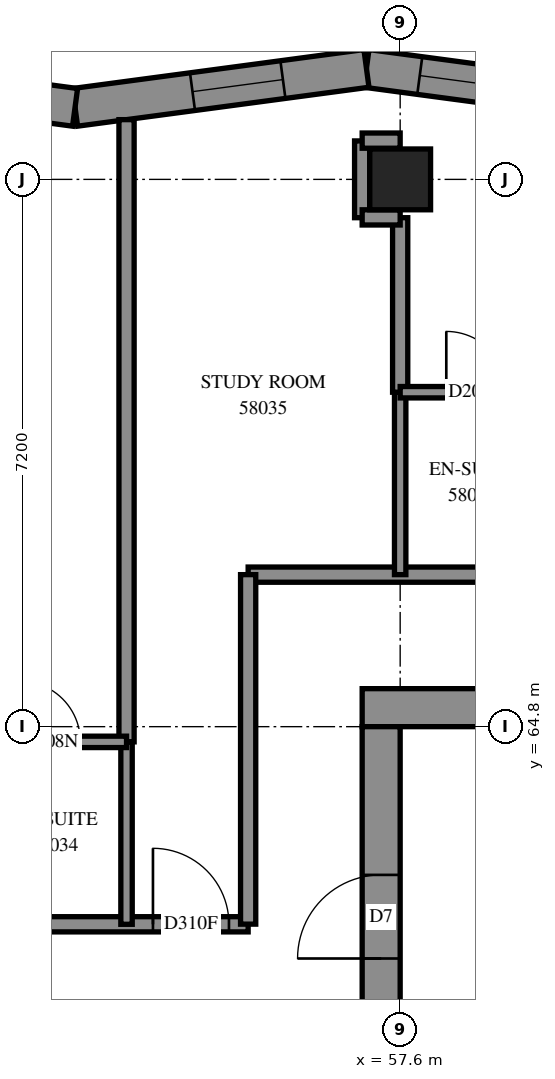
"""IFC4 building model, lengths in metres.
Left out: names, types, materials, properties, quantities, classifications, styles, units other than length and angle.
Written with IfcOpenShell. Run it as: python <this file> out.ifc"""

import sys

from ifc_helpers import new_model, si_unit, direction, frame, frame_2d, origin, origin_2d, place, context, subcontext, project, spatial, polyline, rectangle, outline, extrude, element, fill, save


model = new_model("IFC4")
c1 = context("Model", 3, precision=1e-05, world=origin(), true_north=direction((0.0, 1.0)))
c2 = subcontext(c1, "Body", "Model", "MODEL_VIEW")
j1 = project(units=[si_unit("LENGTHUNIT", "METRE"), si_unit("PLANEANGLEUNIT", "RADIAN")], contexts=[c1])
p1 = place(None, origin())
s1 = spatial("IfcSite", under=j1, at=p1, CompositionType="ELEMENT")
p2 = place(p1, origin())
s2 = spatial("IfcBuilding", under=s1, at=p2, CompositionType="ELEMENT")
p3 = place(p2, frame((0.0, 0.0, 213.4)))
s3 = spatial("IfcBuildingStorey", under=s2, at=p3, CompositionType="ELEMENT", Elevation=213.4)
p4 = place(p3, frame((57.6, 72.0, 0.0), z_axis=(0.0, 0.0, 1.0), x_axis=(1.0, 0.0, 0.0)))
e1 = element("IfcColumn", 1, at=p4, inside=s3, PredefinedType="COLUMN", context=c2, shape_type="SweptSolid", body=[
    extrude(rectangle(XDim=0.8, YDim=0.8, at=origin_2d()), origin(), (0.0, 0.0, 1.0), 3.1),
])
p5 = place(p3, frame((57.1, 65.05, -0.3), z_axis=(0.0, 0.0, 1.0), x_axis=(1.0, 0.0, 0.0)))
e2 = element("IfcWall", 2, at=p5, inside=s3, PredefinedType="SHEAR", context=c2, shape_type="SweptSolid", body=[
    extrude(rectangle(XDim=15.4, YDim=0.5, at=frame_2d((7.7, 0.0))), origin(), (0.0, 0.0, 1.0), 2.7),
])
p6 = place(p5, frame((10.5, 0.0, 0.3)))
e3 = element("IfcOpeningElement", 3, at=p6, cuts=e2, PredefinedType="OPENING", context=c2, shape_type="SweptSolid", body=[
    extrude(rectangle(XDim=0.8, YDim=2.1, at=frame_2d((0.4, 1.05))), frame((0.0, 0.26, 0.0), z_axis=(0.0, -1.0, 0.0), x_axis=(1.0, 0.0, 0.0)), (0.0, 0.0, 1.0), 0.52),
])
p7 = place(p3, frame((57.35, 50.4, -0.3), z_axis=(0.0, 0.0, 1.0), x_axis=(0.0, 1.0, 0.0)))
e4 = element("IfcWall", 4, at=p7, inside=s3, PredefinedType="SHEAR", context=c2, shape_type="SweptSolid", body=[
    extrude(rectangle(XDim=14.4, YDim=0.5, at=frame_2d((7.2, 0.0))), origin(), (0.0, 0.0, 1.0), 2.7),
])
p8 = place(p7, frame((4.55, 0.0, 0.3)))
e5 = element("IfcOpeningElement", 5, at=p8, cuts=e4, PredefinedType="OPENING", context=c2, shape_type="SweptSolid", body=[
    extrude(rectangle(XDim=1.1, YDim=2.1, at=frame_2d((0.55, 1.05))), frame((0.0, 0.26, 0.0), z_axis=(0.0, -1.0, 0.0), x_axis=(1.0, 0.0, 0.0)), (0.0, 0.0, 1.0), 0.52),
])
p9 = place(p7, frame((11.35, 0.0, 0.3)))
e6 = element("IfcOpeningElement", 6, at=p9, cuts=e4, PredefinedType="OPENING", context=c2, shape_type="SweptSolid", body=[
    extrude(rectangle(XDim=1.1, YDim=2.1, at=frame_2d((0.55, 1.05))), frame((0.0, 0.26, 0.0), z_axis=(0.0, -1.0, 0.0), x_axis=(1.0, 0.0, 0.0)), (0.0, 0.0, 1.0), 0.52),
])
p10 = place(p3, frame((60.99, 72.948, 0.0), z_axis=(0.0, 0.0, 1.0), x_axis=(-0.9911989729, 0.1323804972, 0.0)))
e7 = element("IfcWall", 7, at=p10, inside=s3, PredefinedType="SOLIDWALL", context=c2, shape_type="SweptSolid", body=[
    extrude(outline(polyline([(0.033, -0.25), (3.901, -0.25), (3.834, 0.25), (-0.033, 0.25), (0.033, -0.25)])), origin(), (0.0, 0.0, 1.0), 3.1),
])
p11 = place(p10, frame((0.41, 0.0, 0.45)))
e8 = element("IfcOpeningElement", 8, at=p11, cuts=e7, PredefinedType="OPENING", context=c2, shape_type="SweptSolid", body=[
    extrude(rectangle(XDim=1.3, YDim=2.5, at=frame_2d((0.65, 1.25))), frame((0.0, 0.26, 0.0), z_axis=(0.0, -1.0, 0.0), x_axis=(1.0, 0.0, 0.0)), (0.0, 0.0, 1.0), 0.52),
])
p12 = place(p10, frame((1.86, 0.0, 0.45)))
e9 = element("IfcOpeningElement", 9, at=p12, cuts=e7, PredefinedType="OPENING", context=c2, shape_type="SweptSolid", body=[
    extrude(rectangle(XDim=1.3, YDim=2.5, at=frame_2d((0.65, 1.25))), frame((0.0, 0.26, 0.0), z_axis=(0.0, -1.0, 0.0), x_axis=(1.0, 0.0, 0.0)), (0.0, 0.0, 1.0), 0.52),
])
p13 = place(p3, frame((57.156, 73.46, 0.0), z_axis=(0.0, 0.0, 1.0), x_axis=(-0.9911985198, -0.13238389, 0.0)))
e10 = element("IfcWall", 10, at=p13, inside=s3, PredefinedType="SOLIDWALL", context=c2, shape_type="SweptSolid", body=[
    extrude(outline(polyline([(-0.033, -0.25), (3.834, -0.25), (3.901, 0.25), (0.033, 0.25), (-0.033, -0.25)])), origin(), (0.0, 0.0, 1.0), 3.1),
])
p14 = place(p13, frame((1.109, 0.0, 0.45)))
e11 = element("IfcOpeningElement", 11, at=p14, cuts=e10, PredefinedType="OPENING", context=c2, shape_type="SweptSolid", body=[
    extrude(rectangle(XDim=1.2, YDim=2.5, at=frame_2d((0.6, 1.25))), frame((0.0, 0.26, 0.0), z_axis=(0.0, -1.0, 0.0), x_axis=(1.0, 0.0, 0.0)), (0.0, 0.0, 1.0), 0.52),
])
p15 = place(p3, frame((53.323, 72.948, 0.0), z_axis=(0.0, 0.0, 1.0), x_axis=(-0.9911989729, 0.1323804972, 0.0)))
e12 = element("IfcWall", 12, at=p15, inside=s3, PredefinedType="SOLIDWALL", context=c2, shape_type="SweptSolid", body=[
    extrude(outline(polyline([(0.033, -0.25), (3.901, -0.25), (3.834, 0.25), (-0.033, 0.25), (0.033, -0.25)])), origin(), (0.0, 0.0, 1.0), 3.1),
])
p16 = place(p15, frame((0.974, 0.0, 0.45)))
e13 = element("IfcOpeningElement", 13, at=p16, cuts=e12, PredefinedType="OPENING", context=c2, shape_type="SweptSolid", body=[
    extrude(rectangle(XDim=1.2, YDim=2.5, at=frame_2d((0.6, 1.25))), frame((0.0, 0.26, 0.0), z_axis=(0.0, -1.0, 0.0), x_axis=(1.0, 0.0, 0.0)), (0.0, 0.0, 1.0), 0.52),
])
p17 = place(p3, frame((55.6, 66.8, 0.0), z_axis=(0.0, 0.0, 1.0), x_axis=(1.0, 0.0, 0.0)))
e14 = element("IfcWall", 14, at=p17, inside=s3, PredefinedType="PARTITIONING", context=c2, shape_type="SweptSolid", body=[
    extrude(rectangle(XDim=18.4, YDim=0.2, at=frame_2d((9.2, 0.0))), origin(), (0.0, 0.0, 1.0), 3.1),
])
p18 = place(p17, frame((4.25, 0.0, 0.0)))
e15 = element("IfcOpeningElement", 15, at=p18, cuts=e14, PredefinedType="OPENING", context=c2, shape_type="SweptSolid", body=[
    extrude(rectangle(XDim=0.9, YDim=2.1, at=frame_2d((0.45, 1.05))), frame((0.0, 0.11, 0.0), z_axis=(0.0, -1.0, 0.0), x_axis=(1.0, 0.0, 0.0)), (0.0, 0.0, 1.0), 0.22),
])
p19 = place(p17, frame((7.974, 0.0, 0.0)))
e16 = element("IfcOpeningElement", 16, at=p19, cuts=e14, PredefinedType="OPENING", context=c2, shape_type="SweptSolid", body=[
    extrude(rectangle(XDim=1.0, YDim=2.1, at=frame_2d((0.5, 1.05))), frame((0.0, 0.11, 0.0), z_axis=(0.0, -1.0, 0.0), x_axis=(1.0, 0.0, 0.0)), (0.0, 0.0, 1.0), 0.22),
])
p20 = place(p17, frame((13.2, 0.0, 0.0)))
e17 = element("IfcOpeningElement", 17, at=p20, cuts=e14, PredefinedType="OPENING", context=c2, shape_type="SweptSolid", body=[
    extrude(rectangle(XDim=0.9, YDim=2.1, at=frame_2d((0.45, 1.05))), frame((0.0, 0.11, 0.0), z_axis=(0.0, -1.0, 0.0), x_axis=(1.0, 0.0, 0.0)), (0.0, 0.0, 1.0), 0.22),
])
p21 = place(p3, frame((40.602, 62.2, 0.0), z_axis=(0.0, 0.0, 1.0), x_axis=(1.0, 0.0, 0.0)))
e18 = element("IfcWall", 18, at=p21, inside=s3, PredefinedType="PARTITIONING", context=c2, shape_type="SweptSolid", body=[
    extrude(rectangle(XDim=14.998, YDim=0.2, at=frame_2d((7.499, 0.0))), origin(), (0.0, 0.0, 1.0), 3.1),
])
p22 = place(p21, frame((6.308, 0.0, 0.0)))
e19 = element("IfcOpeningElement", 19, at=p22, cuts=e18, PredefinedType="OPENING", context=c2, shape_type="SweptSolid", body=[
    extrude(rectangle(XDim=1.0, YDim=2.1, at=frame_2d((0.5, 1.05))), frame((0.0, 0.11, 0.0), z_axis=(0.0, -1.0, 0.0), x_axis=(1.0, 0.0, 0.0)), (0.0, 0.0, 1.0), 0.22),
])
p23 = place(p21, frame((9.928, 0.0, 0.0)))
e20 = element("IfcOpeningElement", 20, at=p23, cuts=e18, PredefinedType="OPENING", context=c2, shape_type="SweptSolid", body=[
    extrude(rectangle(XDim=0.9, YDim=2.1, at=frame_2d((0.45, 1.05))), frame((0.0, 0.11, 0.0), z_axis=(0.0, -1.0, 0.0), x_axis=(1.0, 0.0, 0.0)), (0.0, 0.0, 1.0), 0.22),
])
p24 = place(p21, frame((13.746, 0.0, 0.0)))
e21 = element("IfcOpeningElement", 21, at=p24, cuts=e18, PredefinedType="OPENING", context=c2, shape_type="SweptSolid", body=[
    extrude(rectangle(XDim=1.0, YDim=2.1, at=frame_2d((0.5, 1.05))), frame((0.0, 0.11, 0.0), z_axis=(0.0, -1.0, 0.0), x_axis=(1.0, 0.0, 0.0)), (0.0, 0.0, 1.0), 0.22),
])
p25 = place(p3, frame((54.0, 64.6, 0.0), z_axis=(0.0, 0.0, 1.0), x_axis=(0.0, 1.0, 0.0)))
e22 = element("IfcWall", 22, at=p25, inside=s3, PredefinedType="PARTITIONING", context=c2, shape_type="SweptSolid", body=[
    extrude(rectangle(XDim=8.186, YDim=0.2, at=frame_2d((4.093, 0.0))), origin(), (0.0, 0.0, 1.0), 3.1),
])
p26 = place(p3, frame((55.6, 62.202, 0.0), z_axis=(0.0, 0.0, 1.0), x_axis=(0.0, 1.0, 0.0)))
e23 = element("IfcWall", 23, at=p26, inside=s3, PredefinedType="PARTITIONING", context=c2, shape_type="SweptSolid", body=[
    extrude(rectangle(XDim=4.598, YDim=0.2, at=frame_2d((2.299, 0.0))), origin(), (0.0, 0.0, 1.0), 3.1),
])
for number, where, z_axis, x_axis in (
    (24, (57.6, 66.8, 0.0), (0.0, 0.0, 1.0), (0.0, 1.0, 0.0)),
    (25, (54.0, 62.2, 0.0), (0.0, 0.0, 1.0), (0.0, 1.0, 0.0)),
):
    element("IfcWall", number, at=place(p3, frame(where, z_axis=z_axis, x_axis=x_axis)), inside=s3, PredefinedType="PARTITIONING", context=c2, shape_type="SweptSolid", body=[
        extrude(rectangle(XDim=2.4, YDim=0.15, at=frame_2d((1.2, 0.0))), origin(), (0.0, 0.0, 1.0), 3.1),
    ])
p27 = place(p3, frame((57.6, 69.2, 0.0), z_axis=(0.0, 0.0, 1.0), x_axis=(0.0, 1.0, 0.0)))
e26 = element("IfcWall", 26, at=p27, inside=s3, PredefinedType="PARTITIONING", context=c2, shape_type="SweptSolid", body=[
    extrude(rectangle(XDim=2.296, YDim=0.2, at=frame_2d((1.148, 0.0))), origin(), (0.0, 0.0, 1.0), 3.1),
])
p28 = place(p3, frame((52.1, 64.6, 0.0), z_axis=(0.0, 0.0, 1.0), x_axis=(1.0, 0.0, 0.0)))
e27 = element("IfcWall", 27, at=p28, inside=s3, PredefinedType="PARTITIONING", context=c2, shape_type="SweptSolid", body=[
    extrude(rectangle(XDim=1.9, YDim=0.15, at=frame_2d((0.95, 0.0))), origin(), (0.0, 0.0, 1.0), 3.1),
])
p29 = place(p28, frame((0.493, 0.0, 0.0)))
e28 = element("IfcOpeningElement", 28, at=p29, cuts=e27, PredefinedType="OPENING", context=c2, shape_type="SweptSolid", body=[
    extrude(rectangle(XDim=0.8, YDim=2.1, at=frame_2d((0.4, 1.05))), frame((0.0, 0.085, 0.0), z_axis=(0.0, -1.0, 0.0), x_axis=(1.0, 0.0, 0.0)), (0.0, 0.0, 1.0), 0.17),
])
p30 = place(p3, frame((57.6, 69.2, 0.0), z_axis=(0.0, 0.0, 1.0), x_axis=(1.0, 0.0, 0.0)))
e29 = element("IfcWall", 29, at=p30, inside=s3, PredefinedType="PARTITIONING", context=c2, shape_type="SweptSolid", body=[
    extrude(rectangle(XDim=1.9, YDim=0.15, at=frame_2d((0.95, 0.0))), origin(), (0.0, 0.0, 1.0), 3.1),
])
p31 = place(p30, frame((0.607, 0.0, 0.0)))
e30 = element("IfcOpeningElement", 30, at=p31, cuts=e29, PredefinedType="OPENING", context=c2, shape_type="SweptSolid", body=[
    extrude(rectangle(XDim=0.8, YDim=2.1, at=frame_2d((0.4, 1.05))), frame((0.0, 0.085, 0.0), z_axis=(0.0, -1.0, 0.0), x_axis=(1.0, 0.0, 0.0)), (0.0, 0.0, 1.0), 0.17),
])
p32 = place(p3, frame((57.1, 71.496, 0.0), z_axis=(0.0, 0.0, 1.0), x_axis=(0.0, 1.0, 0.0)))
e31 = element("IfcWall", 31, at=p32, inside=s3, PredefinedType="PARTITIONING", context=c2, shape_type="SweptSolid", body=[
    extrude(rectangle(XDim=1.01, YDim=0.2, at=frame_2d((0.505, 0.0))), origin(), (0.0, 0.0, 1.0), 3.1),
])
for number, where, z_axis, x_axis in (
    (32, (57.1, 72.51, 0.0), (0.0, 0.0, 1.0), (1.0, 0.0, 0.0)),
    (33, (57.1, 71.5, 0.0), (0.0, 0.0, 1.0), (1.0, 0.0, 0.0)),
):
    element("IfcWall", number, at=place(p3, frame(where, z_axis=z_axis, x_axis=x_axis)), inside=s3, PredefinedType="PARTITIONING", context=c2, shape_type="SweptSolid", body=[
        extrude(rectangle(XDim=0.5, YDim=0.2, at=frame_2d((0.25, 0.0))), origin(), (0.0, 0.0, 1.0), 3.1),
    ])
p33 = place(p12, origin())
e34 = element("IfcWindow", 34, at=p33, inside=s3, PartitioningType="SINGLE_PANEL", PredefinedType="WINDOW", context=c2, shape_type="SweptSolid", body=[
    extrude(rectangle(XDim=1.3, YDim=2.5, at=frame_2d((0.65, 1.25))), frame((0.0, 0.18, 0.0), z_axis=(0.0, -1.0, 0.0), x_axis=(1.0, 0.0, 0.0)), (0.0, 0.0, 1.0), 0.06),
])
fill(e9, e34)
p34 = place(p14, origin())
e35 = element("IfcWindow", 35, at=p34, inside=s3, PartitioningType="SINGLE_PANEL", PredefinedType="WINDOW", context=c2, shape_type="SweptSolid", body=[
    extrude(rectangle(XDim=1.2, YDim=2.5, at=frame_2d((0.6, 1.25))), frame((0.0, 0.18, 0.0), z_axis=(0.0, -1.0, 0.0), x_axis=(1.0, 0.0, 0.0)), (0.0, 0.0, 1.0), 0.06),
])
fill(e11, e35)
p35 = place(p9, origin())
e36 = element("IfcDoor", 36, at=p35, inside=s3, OperationType="SINGLE_SWING_LEFT", PredefinedType="DOOR", context=c2, shape_type="SweptSolid", body=[
    extrude(rectangle(XDim=1.1, YDim=2.1, at=frame_2d((0.55, 1.05))), frame((0.0, 0.025, 0.0), z_axis=(0.0, -1.0, 0.0), x_axis=(1.0, 0.0, 0.0)), (0.0, 0.0, 1.0), 0.05),
])
fill(e6, e36)
p36 = place(p31, origin())
e37 = element("IfcDoor", 37, at=p36, inside=s3, OperationType="SINGLE_SWING_RIGHT", PredefinedType="DOOR", context=c2, shape_type="SweptSolid", body=[
    extrude(rectangle(XDim=0.8, YDim=2.1, at=frame_2d((0.4, 1.05))), frame((0.0, 0.025, 0.0), z_axis=(0.0, -1.0, 0.0), x_axis=(1.0, 0.0, 0.0)), (0.0, 0.0, 1.0), 0.05),
])
fill(e30, e37)
p37 = place(p29, origin())
e38 = element("IfcDoor", 38, at=p37, inside=s3, OperationType="SINGLE_SWING_RIGHT", PredefinedType="DOOR", context=c2, shape_type="SweptSolid", body=[
    extrude(rectangle(XDim=0.8, YDim=2.1, at=frame_2d((0.4, 1.05))), frame((0.0, 0.025, 0.0), z_axis=(0.0, -1.0, 0.0), x_axis=(1.0, 0.0, 0.0)), (0.0, 0.0, 1.0), 0.05),
])
fill(e28, e38)
p38 = place(p24, origin())
e39 = element("IfcDoor", 39, at=p38, inside=s3, OperationType="SINGLE_SWING_LEFT", PredefinedType="DOOR", context=c2, shape_type="SweptSolid", body=[
    extrude(rectangle(XDim=1.0, YDim=2.1, at=frame_2d((0.5, 1.05))), frame((0.0, 0.025, 0.0), z_axis=(0.0, -1.0, 0.0), x_axis=(1.0, 0.0, 0.0)), (0.0, 0.0, 1.0), 0.05),
])
fill(e21, e39)
save(model, sys.argv[1])
